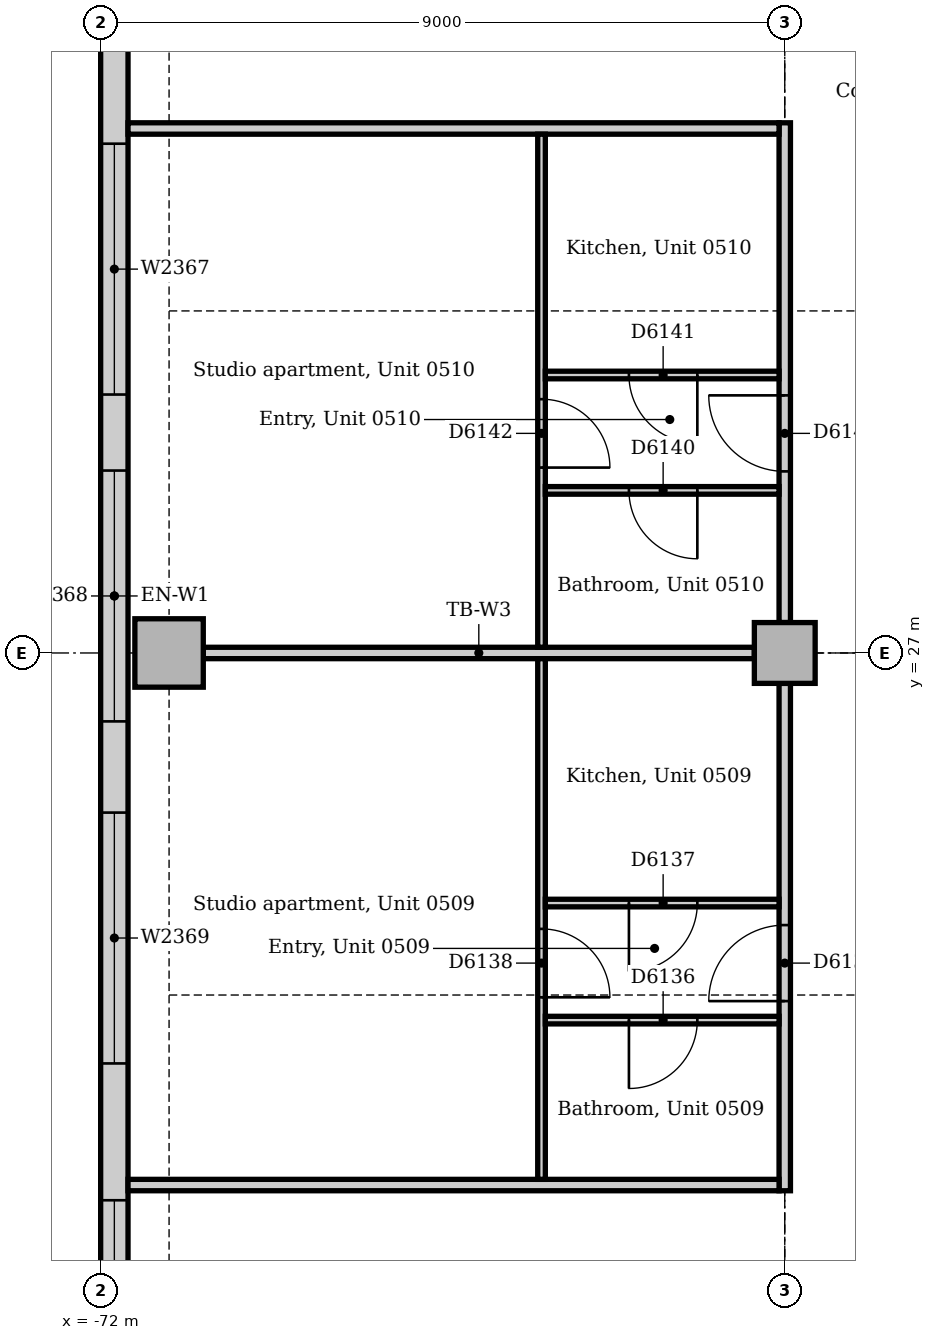
"""IFC4 building model, lengths in metres.
Left out: names, types, materials, properties, quantities, classifications, styles, units other than length and angle.
Written with IfcOpenShell. Run it as: python <this file> out.ifc"""

import sys

from ifc_helpers import new_model, si_unit, direction, frame, frame_2d, origin, origin_2d, place, context, subcontext, project, spatial, rectangle, extrude, element, fill, save


model = new_model("IFC4")
c1 = context("Model", 3, precision=1e-05, world=origin(), true_north=direction((0.0, 1.0)))
c2 = subcontext(c1, "Body", "Model", "MODEL_VIEW")
j1 = project(units=[si_unit("LENGTHUNIT", "METRE"), si_unit("PLANEANGLEUNIT", "RADIAN")], contexts=[c1])
p1 = place(None, origin())
s1 = spatial("IfcSite", under=j1, at=p1, CompositionType="ELEMENT")
p2 = place(p1, origin())
s2 = spatial("IfcBuilding", under=s1, at=p2, CompositionType="ELEMENT")
p3 = place(p2, frame((0.0, 0.0, 26.0)))
s3 = spatial("IfcBuildingStorey", under=s2, at=p3, CompositionType="ELEMENT", Elevation=26.0)
p4 = place(p3, frame((-71.1, 27.0, 0.0), z_axis=(0.0, 0.0, 1.0), x_axis=(1.0, 0.0, 0.0)))
e1 = element("IfcColumn", 1, at=p4, inside=s3, PredefinedType="COLUMN", context=c2, shape_type="SweptSolid", body=[
    extrude(rectangle(XDim=0.9, YDim=0.9, at=origin_2d()), origin(), (0.0, 0.0, 1.0), 3.85),
])
p5 = place(p3, frame((-63.0, 27.0, 0.0), z_axis=(0.0, 0.0, 1.0), x_axis=(1.0, 0.0, 0.0)))
e2 = element("IfcColumn", 2, at=p5, inside=s3, PredefinedType="COLUMN", context=c2, shape_type="SweptSolid", body=[
    extrude(rectangle(XDim=0.8, YDim=0.8, at=origin_2d()), origin(), (0.0, 0.0, 1.0), 3.85),
])
p6 = place(p3, frame((-71.82, 40.757, 0.0), z_axis=(0.0, 0.0, 1.0), x_axis=(0.0, -1.0, 0.0)))
e3 = element("IfcWall", 3, at=p6, inside=s3, PredefinedType="STANDARD", context=c2, shape_type="SweptSolid", body=[
    extrude(rectangle(XDim=26.015, YDim=0.36, at=frame_2d((13.007, 0.0))), origin(), (0.0, 0.0, 1.0), 3.85),
])
p7 = place(p6, frame((2.357, 0.0, 0.9)))
e4 = element("IfcOpeningElement", 4, at=p7, cuts=e3, PredefinedType="OPENING", context=c2, shape_type="SweptSolid", body=[
    extrude(rectangle(XDim=3.3, YDim=1.6, at=frame_2d((1.65, 0.8))), frame((0.0, 0.19, 0.0), z_axis=(0.0, -1.0, 0.0), x_axis=(1.0, 0.0, 0.0)), (0.0, 0.0, 1.0), 0.38),
])
p8 = place(p6, frame((7.057, 0.0, 0.9)))
e5 = element("IfcOpeningElement", 5, at=p8, cuts=e3, PredefinedType="OPENING", context=c2, shape_type="SweptSolid", body=[
    extrude(rectangle(XDim=3.3, YDim=1.6, at=frame_2d((1.65, 0.8))), frame((0.0, 0.19, 0.0), z_axis=(0.0, -1.0, 0.0), x_axis=(1.0, 0.0, 0.0)), (0.0, 0.0, 1.0), 0.38),
])
p9 = place(p6, frame((11.357, 0.0, 0.9)))
e6 = element("IfcOpeningElement", 6, at=p9, cuts=e3, PredefinedType="OPENING", context=c2, shape_type="SweptSolid", body=[
    extrude(rectangle(XDim=3.3, YDim=1.6, at=frame_2d((1.65, 0.8))), frame((0.0, 0.19, 0.0), z_axis=(0.0, -1.0, 0.0), x_axis=(1.0, 0.0, 0.0)), (0.0, 0.0, 1.0), 0.38),
])
p10 = place(p6, frame((15.857, 0.0, 0.9)))
e7 = element("IfcOpeningElement", 7, at=p10, cuts=e3, PredefinedType="OPENING", context=c2, shape_type="SweptSolid", body=[
    extrude(rectangle(XDim=3.3, YDim=1.6, at=frame_2d((1.65, 0.8))), frame((0.0, 0.19, 0.0), z_axis=(0.0, -1.0, 0.0), x_axis=(1.0, 0.0, 0.0)), (0.0, 0.0, 1.0), 0.38),
])
p11 = place(p6, frame((20.957, 0.0, 0.9)))
e8 = element("IfcOpeningElement", 8, at=p11, cuts=e3, PredefinedType="OPENING", context=c2, shape_type="SweptSolid", body=[
    extrude(rectangle(XDim=3.3, YDim=1.6, at=frame_2d((1.65, 0.8))), frame((0.0, 0.19, 0.0), z_axis=(0.0, -1.0, 0.0), x_axis=(1.0, 0.0, 0.0)), (0.0, 0.0, 1.0), 0.38),
])
p12 = place(p3, frame((-63.0, 19.925, 0.0), z_axis=(0.0, 0.0, 1.0), x_axis=(0.0, 1.0, 0.0)))
e9 = element("IfcWall", 9, at=p12, inside=s3, PredefinedType="PARTITIONING", context=c2, shape_type="SweptSolid", body=[
    extrude(rectangle(XDim=6.675, YDim=0.15, at=frame_2d((3.337, 0.0))), origin(), (0.0, 0.0, 1.0), 3.158),
])
p13 = place(p12, frame((2.495, 0.0, 0.0)))
e10 = element("IfcOpeningElement", 10, at=p13, cuts=e9, PredefinedType="OPENING", context=c2, shape_type="SweptSolid", body=[
    extrude(rectangle(XDim=1.0, YDim=2.1, at=frame_2d((0.5, 1.05))), frame((0.0, 0.085, 0.0), z_axis=(0.0, -1.0, 0.0), x_axis=(1.0, 0.0, 0.0)), (0.0, 0.0, 1.0), 0.17),
])
p14 = place(p3, frame((-63.0, 27.4, 0.0), z_axis=(0.0, 0.0, 1.0), x_axis=(0.0, 1.0, 0.0)))
e11 = element("IfcWall", 11, at=p14, inside=s3, PredefinedType="PARTITIONING", context=c2, shape_type="SweptSolid", body=[
    extrude(rectangle(XDim=6.575, YDim=0.15, at=frame_2d((3.288, 0.0))), origin(), (0.0, 0.0, 1.0), 3.158),
])
p15 = place(p14, frame((1.989, 0.0, 0.0)))
e12 = element("IfcOpeningElement", 12, at=p15, cuts=e11, PredefinedType="OPENING", context=c2, shape_type="SweptSolid", body=[
    extrude(rectangle(XDim=1.0, YDim=2.1, at=frame_2d((0.5, 1.05))), frame((0.0, 0.085, 0.0), z_axis=(0.0, -1.0, 0.0), x_axis=(1.0, 0.0, 0.0)), (0.0, 0.0, 1.0), 0.17),
])
for number, where, z_axis, x_axis in (
    (13, (-71.64, 20.0, 0.0), (0.0, 0.0, 1.0), (1.0, 0.0, 0.0)),
    (14, (-71.64, 33.9, 0.0), (0.0, 0.0, 1.0), (1.0, 0.0, 0.0)),
):
    element("IfcWall", number, at=place(p3, frame(where, z_axis=z_axis, x_axis=x_axis)), inside=s3, PredefinedType="PARTITIONING", context=c2, shape_type="SweptSolid", body=[
        extrude(rectangle(XDim=8.565, YDim=0.15, at=frame_2d((4.282, 0.0))), origin(), (0.0, 0.0, 1.0), 3.85),
    ])
p16 = place(p3, frame((-70.65, 27.0, 0.0), z_axis=(0.0, 0.0, 1.0), x_axis=(1.0, 0.0, 0.0)))
e15 = element("IfcWall", 15, at=p16, inside=s3, PredefinedType="PARTITIONING", context=c2, shape_type="SweptSolid", body=[
    extrude(rectangle(XDim=7.25, YDim=0.15, at=frame_2d((3.625, 0.0))), origin(), (0.0, 0.0, 1.0), 3.15),
])
p17 = place(p3, frame((-66.2, 27.075, 0.0), z_axis=(0.0, 0.0, 1.0), x_axis=(0.0, 1.0, 0.0)))
e16 = element("IfcWall", 16, at=p17, inside=s3, PredefinedType="PARTITIONING", context=c2, shape_type="SweptSolid", body=[
    extrude(rectangle(XDim=6.75, YDim=0.1, at=frame_2d((3.375, 0.0))), origin(), (0.0, 0.0, 1.0), 3.85),
])
p18 = place(p17, frame((2.364, 0.0, 0.0)))
e17 = element("IfcOpeningElement", 17, at=p18, cuts=e16, PredefinedType="OPENING", context=c2, shape_type="SweptSolid", body=[
    extrude(rectangle(XDim=0.9, YDim=2.1, at=frame_2d((0.45, 1.05))), frame((0.0, 0.06, 0.0), z_axis=(0.0, -1.0, 0.0), x_axis=(1.0, 0.0, 0.0)), (0.0, 0.0, 1.0), 0.12),
])
p19 = place(p3, frame((-66.2, 20.075, 0.0), z_axis=(0.0, 0.0, 1.0), x_axis=(0.0, 1.0, 0.0)))
e18 = element("IfcWall", 18, at=p19, inside=s3, PredefinedType="PARTITIONING", context=c2, shape_type="SweptSolid", body=[
    extrude(rectangle(XDim=6.85, YDim=0.1, at=frame_2d((3.425, 0.0))), origin(), (0.0, 0.0, 1.0), 3.85),
])
p20 = place(p19, frame((2.395, 0.0, 0.0)))
e19 = element("IfcOpeningElement", 19, at=p20, cuts=e18, PredefinedType="OPENING", context=c2, shape_type="SweptSolid", body=[
    extrude(rectangle(XDim=0.9, YDim=2.1, at=frame_2d((0.45, 1.05))), frame((0.0, 0.06, 0.0), z_axis=(0.0, -1.0, 0.0), x_axis=(1.0, 0.0, 0.0)), (0.0, 0.0, 1.0), 0.12),
])
p21 = place(p3, frame((-66.15, 22.17, 0.0), z_axis=(0.0, 0.0, 1.0), x_axis=(1.0, 0.0, 0.0)))
e20 = element("IfcWall", 20, at=p21, inside=s3, PredefinedType="PARTITIONING", context=c2, shape_type="SweptSolid", body=[
    extrude(rectangle(XDim=3.075, YDim=0.1, at=frame_2d((1.538, 0.0))), origin(), (0.0, 0.0, 1.0), 3.85),
])
p22 = place(p21, frame((1.1, 0.0, 0.0)))
e21 = element("IfcOpeningElement", 21, at=p22, cuts=e20, PredefinedType="OPENING", context=c2, shape_type="SweptSolid", body=[
    extrude(rectangle(XDim=0.9, YDim=2.1, at=frame_2d((0.45, 1.05))), frame((0.0, 0.06, 0.0), z_axis=(0.0, -1.0, 0.0), x_axis=(1.0, 0.0, 0.0)), (0.0, 0.0, 1.0), 0.12),
])
p23 = place(p3, frame((-66.15, 23.71, 0.0), z_axis=(0.0, 0.0, 1.0), x_axis=(1.0, 0.0, 0.0)))
e22 = element("IfcWall", 22, at=p23, inside=s3, PredefinedType="PARTITIONING", context=c2, shape_type="SweptSolid", body=[
    extrude(rectangle(XDim=3.075, YDim=0.1, at=frame_2d((1.538, 0.0))), origin(), (0.0, 0.0, 1.0), 3.85),
])
p24 = place(p23, frame((1.1, 0.0, 0.0)))
e23 = element("IfcOpeningElement", 23, at=p24, cuts=e22, PredefinedType="OPENING", context=c2, shape_type="SweptSolid", body=[
    extrude(rectangle(XDim=0.9, YDim=2.1, at=frame_2d((0.45, 1.05))), frame((0.0, 0.06, 0.0), z_axis=(0.0, -1.0, 0.0), x_axis=(1.0, 0.0, 0.0)), (0.0, 0.0, 1.0), 0.12),
])
p25 = place(p3, frame((-66.15, 29.139, 0.0), z_axis=(0.0, 0.0, 1.0), x_axis=(1.0, 0.0, 0.0)))
e24 = element("IfcWall", 24, at=p25, inside=s3, PredefinedType="PARTITIONING", context=c2, shape_type="SweptSolid", body=[
    extrude(rectangle(XDim=3.075, YDim=0.1, at=frame_2d((1.538, 0.0))), origin(), (0.0, 0.0, 1.0), 3.85),
])
p26 = place(p25, frame((1.1, 0.0, 0.0)))
e25 = element("IfcOpeningElement", 25, at=p26, cuts=e24, PredefinedType="OPENING", context=c2, shape_type="SweptSolid", body=[
    extrude(rectangle(XDim=0.9, YDim=2.1, at=frame_2d((0.45, 1.05))), frame((0.0, 0.06, 0.0), z_axis=(0.0, -1.0, 0.0), x_axis=(1.0, 0.0, 0.0)), (0.0, 0.0, 1.0), 0.12),
])
p27 = place(p3, frame((-66.15, 30.657, 0.0), z_axis=(0.0, 0.0, 1.0), x_axis=(1.0, 0.0, 0.0)))
e26 = element("IfcWall", 26, at=p27, inside=s3, PredefinedType="PARTITIONING", context=c2, shape_type="SweptSolid", body=[
    extrude(rectangle(XDim=3.075, YDim=0.1, at=frame_2d((1.538, 0.0))), origin(), (0.0, 0.0, 1.0), 3.85),
])
p28 = place(p27, frame((1.1, 0.0, 0.0)))
e27 = element("IfcOpeningElement", 27, at=p28, cuts=e26, PredefinedType="OPENING", context=c2, shape_type="SweptSolid", body=[
    extrude(rectangle(XDim=0.9, YDim=2.1, at=frame_2d((0.45, 1.05))), frame((0.0, 0.06, 0.0), z_axis=(0.0, -1.0, 0.0), x_axis=(1.0, 0.0, 0.0)), (0.0, 0.0, 1.0), 0.12),
])
p29 = place(p8, origin())
e28 = element("IfcWindow", 28, at=p29, inside=s3, PartitioningType="SINGLE_PANEL", PredefinedType="WINDOW", context=c2, shape_type="SweptSolid", body=[
    extrude(rectangle(XDim=3.3, YDim=1.6, at=frame_2d((1.65, 0.8))), frame((0.0, 0.13, 0.0), z_axis=(0.0, -1.0, 0.0), x_axis=(1.0, 0.0, 0.0)), (0.0, 0.0, 1.0), 0.06),
])
fill(e5, e28)
p30 = place(p9, origin())
e29 = element("IfcWindow", 29, at=p30, inside=s3, PartitioningType="SINGLE_PANEL", PredefinedType="WINDOW", context=c2, shape_type="SweptSolid", body=[
    extrude(rectangle(XDim=3.3, YDim=1.6, at=frame_2d((1.65, 0.8))), frame((0.0, 0.13, 0.0), z_axis=(0.0, -1.0, 0.0), x_axis=(1.0, 0.0, 0.0)), (0.0, 0.0, 1.0), 0.06),
])
fill(e6, e29)
p31 = place(p10, origin())
e30 = element("IfcWindow", 30, at=p31, inside=s3, PartitioningType="SINGLE_PANEL", PredefinedType="WINDOW", context=c2, shape_type="SweptSolid", body=[
    extrude(rectangle(XDim=3.3, YDim=1.6, at=frame_2d((1.65, 0.8))), frame((0.0, 0.13, 0.0), z_axis=(0.0, -1.0, 0.0), x_axis=(1.0, 0.0, 0.0)), (0.0, 0.0, 1.0), 0.06),
])
fill(e7, e30)
p32 = place(p11, origin())
e31 = element("IfcWindow", 31, at=p32, inside=s3, PartitioningType="SINGLE_PANEL", PredefinedType="WINDOW", context=c2, shape_type="SweptSolid", body=[
    extrude(rectangle(XDim=3.3, YDim=1.6, at=frame_2d((1.65, 0.8))), frame((0.0, 0.13, 0.0), z_axis=(0.0, -1.0, 0.0), x_axis=(1.0, 0.0, 0.0)), (0.0, 0.0, 1.0), 0.06),
])
fill(e8, e31)
p33 = place(p22, frame((0.9, 0.0, 0.0), z_axis=(0.0, 0.0, 1.0), x_axis=(-1.0, 0.0, 0.0)))
e32 = element("IfcDoor", 32, at=p33, inside=s3, OperationType="SINGLE_SWING_RIGHT", PredefinedType="DOOR", context=c2, shape_type="SweptSolid", body=[
    extrude(rectangle(XDim=0.9, YDim=2.1, at=frame_2d((0.45, 1.05))), frame((0.0, 0.025, 0.0), z_axis=(0.0, -1.0, 0.0), x_axis=(1.0, 0.0, 0.0)), (0.0, 0.0, 1.0), 0.05),
])
fill(e21, e32)
p34 = place(p24, frame((0.9, 0.0, 0.0), z_axis=(0.0, 0.0, 1.0), x_axis=(-1.0, 0.0, 0.0)))
e33 = element("IfcDoor", 33, at=p34, inside=s3, OperationType="SINGLE_SWING_RIGHT", PredefinedType="DOOR", context=c2, shape_type="SweptSolid", body=[
    extrude(rectangle(XDim=0.9, YDim=2.1, at=frame_2d((0.45, 1.05))), frame((0.0, 0.025, 0.0), z_axis=(0.0, -1.0, 0.0), x_axis=(1.0, 0.0, 0.0)), (0.0, 0.0, 1.0), 0.05),
])
fill(e23, e33)
p35 = place(p20, frame((0.9, 0.0, 0.0), z_axis=(0.0, 0.0, 1.0), x_axis=(-1.0, 0.0, 0.0)))
e34 = element("IfcDoor", 34, at=p35, inside=s3, OperationType="SINGLE_SWING_RIGHT", PredefinedType="DOOR", context=c2, shape_type="SweptSolid", body=[
    extrude(rectangle(XDim=0.9, YDim=2.1, at=frame_2d((0.45, 1.05))), frame((0.0, 0.025, 0.0), z_axis=(0.0, -1.0, 0.0), x_axis=(1.0, 0.0, 0.0)), (0.0, 0.0, 1.0), 0.05),
])
fill(e19, e34)
p36 = place(p13, origin())
e35 = element("IfcDoor", 35, at=p36, inside=s3, OperationType="SINGLE_SWING_LEFT", PredefinedType="DOOR", context=c2, shape_type="SweptSolid", body=[
    extrude(rectangle(XDim=1.0, YDim=2.1, at=frame_2d((0.5, 1.05))), frame((0.0, 0.025, 0.0), z_axis=(0.0, -1.0, 0.0), x_axis=(1.0, 0.0, 0.0)), (0.0, 0.0, 1.0), 0.05),
])
fill(e10, e35)
p37 = place(p26, frame((0.9, 0.0, 0.0), z_axis=(0.0, 0.0, 1.0), x_axis=(-1.0, 0.0, 0.0)))
e36 = element("IfcDoor", 36, at=p37, inside=s3, OperationType="SINGLE_SWING_LEFT", PredefinedType="DOOR", context=c2, shape_type="SweptSolid", body=[
    extrude(rectangle(XDim=0.9, YDim=2.1, at=frame_2d((0.45, 1.05))), frame((0.0, 0.025, 0.0), z_axis=(0.0, -1.0, 0.0), x_axis=(1.0, 0.0, 0.0)), (0.0, 0.0, 1.0), 0.05),
])
fill(e25, e36)
p38 = place(p28, frame((0.9, 0.0, 0.0), z_axis=(0.0, 0.0, 1.0), x_axis=(-1.0, 0.0, 0.0)))
e37 = element("IfcDoor", 37, at=p38, inside=s3, OperationType="SINGLE_SWING_LEFT", PredefinedType="DOOR", context=c2, shape_type="SweptSolid", body=[
    extrude(rectangle(XDim=0.9, YDim=2.1, at=frame_2d((0.45, 1.05))), frame((0.0, 0.025, 0.0), z_axis=(0.0, -1.0, 0.0), x_axis=(1.0, 0.0, 0.0)), (0.0, 0.0, 1.0), 0.05),
])
fill(e27, e37)
p39 = place(p18, frame((0.9, 0.0, 0.0), z_axis=(0.0, 0.0, 1.0), x_axis=(-1.0, 0.0, 0.0)))
e38 = element("IfcDoor", 38, at=p39, inside=s3, OperationType="SINGLE_SWING_RIGHT", PredefinedType="DOOR", context=c2, shape_type="SweptSolid", body=[
    extrude(rectangle(XDim=0.9, YDim=2.1, at=frame_2d((0.45, 1.05))), frame((0.0, 0.025, 0.0), z_axis=(0.0, -1.0, 0.0), x_axis=(1.0, 0.0, 0.0)), (0.0, 0.0, 1.0), 0.05),
])
fill(e17, e38)
p40 = place(p15, origin())
e39 = element("IfcDoor", 39, at=p40, inside=s3, OperationType="SINGLE_SWING_RIGHT", PredefinedType="DOOR", context=c2, shape_type="SweptSolid", body=[
    extrude(rectangle(XDim=1.0, YDim=2.1, at=frame_2d((0.5, 1.05))), frame((0.0, 0.025, 0.0), z_axis=(0.0, -1.0, 0.0), x_axis=(1.0, 0.0, 0.0)), (0.0, 0.0, 1.0), 0.05),
])
fill(e12, e39)
save(model, sys.argv[1])
